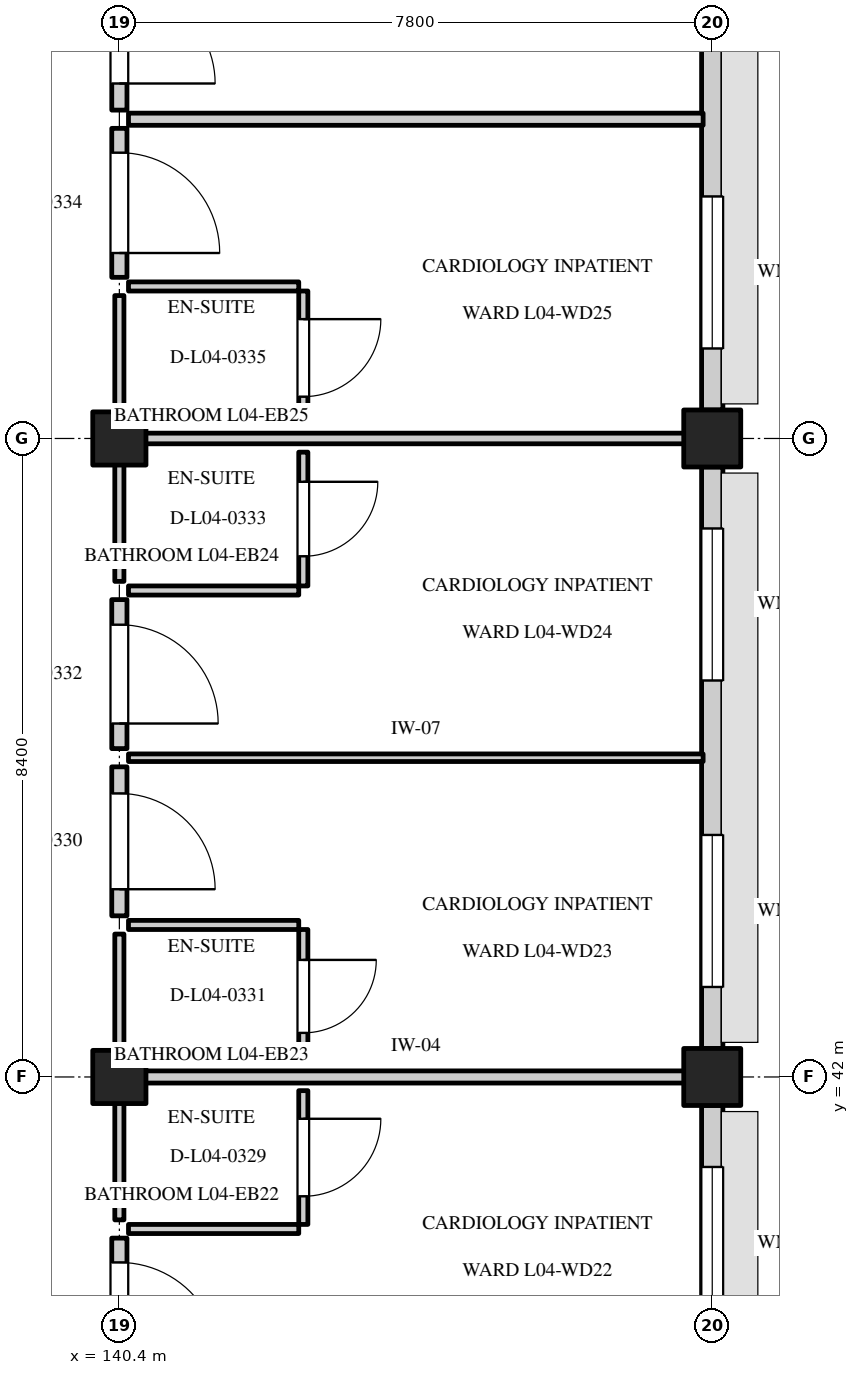
"""IFC4 building model, lengths in metres.
Left out: names, types, materials, properties, quantities, classifications, styles, units other than length and angle.
Written with IfcOpenShell. Run it as: python <this file> out.ifc"""

import sys

from ifc_helpers import new_model, si_unit, direction, frame, frame_2d, origin, origin_2d, place, context, subcontext, project, spatial, rectangle, extrude, element, fill, save


model = new_model("IFC4")
c1 = context("Model", 3, precision=1e-05, world=origin(), true_north=direction((0.0, 1.0)))
c2 = subcontext(c1, "Body", "Model", "MODEL_VIEW")
j1 = project(units=[si_unit("LENGTHUNIT", "METRE"), si_unit("PLANEANGLEUNIT", "RADIAN")], contexts=[c1])
p1 = place(None, origin())
s1 = spatial("IfcSite", under=j1, at=p1, CompositionType="ELEMENT")
p2 = place(p1, origin())
s2 = spatial("IfcBuilding", under=s1, at=p2, CompositionType="ELEMENT")
p3 = place(p2, frame((0.0, 0.0, 18.0)))
s3 = spatial("IfcBuildingStorey", under=s2, at=p3, CompositionType="ELEMENT", Elevation=18.0)
for number, where, z_axis, x_axis in (
    (1, (140.4, 42.0, 0.0), (0.0, 0.0, 1.0), (1.0, 0.0, 0.0)),
    (2, (140.4, 50.4, 0.0), (0.0, 0.0, 1.0), (1.0, 0.0, 0.0)),
):
    element("IfcColumn", number, at=place(p3, frame(where, z_axis=z_axis, x_axis=x_axis)), inside=s3, PredefinedType="COLUMN", context=c2, shape_type="SweptSolid", body=[
        extrude(rectangle(XDim=0.7, YDim=0.7, at=origin_2d()), origin(), (0.0, 0.0, 1.0), 4.2),
    ])
for number, where, z_axis, x_axis in (
    (3, (148.2, 42.0, 0.0), (0.0, 0.0, 1.0), (1.0, 0.0, 0.0)),
    (4, (148.2, 50.4, 0.0), (0.0, 0.0, 1.0), (1.0, 0.0, 0.0)),
):
    element("IfcColumn", number, at=place(p3, frame(where, z_axis=z_axis, x_axis=x_axis)), inside=s3, PredefinedType="COLUMN", context=c2, shape_type="SweptSolid", body=[
        extrude(rectangle(XDim=0.75, YDim=0.75, at=origin_2d()), origin(), (0.0, 0.0, 1.0), 4.2),
    ])
p4 = place(p3, frame((148.2, 33.975, 0.0), z_axis=(0.0, 0.0, 1.0), x_axis=(0.0, 1.0, 0.0)))
e5 = element("IfcWall", 5, at=p4, inside=s3, PredefinedType="STANDARD", context=c2, shape_type="SweptSolid", body=[
    extrude(rectangle(XDim=7.65, YDim=0.28, at=frame_2d((3.825, 0.0))), origin(), (0.0, 0.0, 1.0), 3.235),
])
p5 = place(p4, frame((0.809, 0.0, 0.8)))
e6 = element("IfcOpeningElement", 6, at=p5, cuts=e5, PredefinedType="OPENING", context=c2, shape_type="SweptSolid", body=[
    extrude(rectangle(XDim=2.0, YDim=1.75, at=frame_2d((1.0, 0.875))), frame((0.0, 0.152, 0.0), z_axis=(0.0, -1.0, 0.0), x_axis=(1.0, 0.0, 0.0)), (0.0, 0.0, 1.0), 0.304),
])
p6 = place(p4, frame((4.841, 0.0, 0.8)))
e7 = element("IfcOpeningElement", 7, at=p6, cuts=e5, PredefinedType="OPENING", context=c2, shape_type="SweptSolid", body=[
    extrude(rectangle(XDim=2.0, YDim=1.75, at=frame_2d((1.0, 0.875))), frame((0.0, 0.152, 0.0), z_axis=(0.0, -1.0, 0.0), x_axis=(1.0, 0.0, 0.0)), (0.0, 0.0, 1.0), 0.304),
])
p7 = place(p3, frame((148.2, 42.375, 0.0), z_axis=(0.0, 0.0, 1.0), x_axis=(0.0, 1.0, 0.0)))
e8 = element("IfcWall", 8, at=p7, inside=s3, PredefinedType="STANDARD", context=c2, shape_type="SweptSolid", body=[
    extrude(rectangle(XDim=7.65, YDim=0.28, at=frame_2d((3.825, 0.0))), origin(), (0.0, 0.0, 1.0), 3.235),
])
p8 = place(p7, frame((0.809, 0.0, 0.8)))
e9 = element("IfcOpeningElement", 9, at=p8, cuts=e8, PredefinedType="OPENING", context=c2, shape_type="SweptSolid", body=[
    extrude(rectangle(XDim=2.0, YDim=1.65, at=frame_2d((1.0, 0.825))), frame((0.0, 0.152, 0.0), z_axis=(0.0, -1.0, 0.0), x_axis=(1.0, 0.0, 0.0)), (0.0, 0.0, 1.0), 0.304),
])
p9 = place(p7, frame((4.841, 0.0, 0.8)))
e10 = element("IfcOpeningElement", 10, at=p9, cuts=e8, PredefinedType="OPENING", context=c2, shape_type="SweptSolid", body=[
    extrude(rectangle(XDim=2.0, YDim=1.65, at=frame_2d((1.0, 0.825))), frame((0.0, 0.152, 0.0), z_axis=(0.0, -1.0, 0.0), x_axis=(1.0, 0.0, 0.0)), (0.0, 0.0, 1.0), 0.304),
])
p10 = place(p3, frame((148.2, 50.775, 0.0), z_axis=(0.0, 0.0, 1.0), x_axis=(0.0, 1.0, 0.0)))
e11 = element("IfcWall", 11, at=p10, inside=s3, PredefinedType="STANDARD", context=c2, shape_type="SweptSolid", body=[
    extrude(rectangle(XDim=7.65, YDim=0.28, at=frame_2d((3.825, 0.0))), origin(), (0.0, 0.0, 1.0), 3.235),
])
p11 = place(p10, frame((0.809, 0.0, 0.8)))
e12 = element("IfcOpeningElement", 12, at=p11, cuts=e11, PredefinedType="OPENING", context=c2, shape_type="SweptSolid", body=[
    extrude(rectangle(XDim=2.0, YDim=1.55, at=frame_2d((1.0, 0.775))), frame((0.0, 0.152, 0.0), z_axis=(0.0, -1.0, 0.0), x_axis=(1.0, 0.0, 0.0)), (0.0, 0.0, 1.0), 0.304),
])
p12 = place(p10, frame((4.841, 0.0, 0.8)))
e13 = element("IfcOpeningElement", 13, at=p12, cuts=e11, PredefinedType="OPENING", context=c2, shape_type="SweptSolid", body=[
    extrude(rectangle(XDim=2.0, YDim=1.55, at=frame_2d((1.0, 0.775))), frame((0.0, 0.152, 0.0), z_axis=(0.0, -1.0, 0.0), x_axis=(1.0, 0.0, 0.0)), (0.0, 0.0, 1.0), 0.304),
])
p13 = place(p3, frame((140.52, 42.0, 0.0), z_axis=(0.0, 0.0, 1.0), x_axis=(1.0, 0.0, 0.0)))
e14 = element("IfcWall", 14, at=p13, inside=s3, PredefinedType="PARTITIONING", context=c2, shape_type="SweptSolid", body=[
    extrude(rectangle(XDim=7.56, YDim=0.16, at=frame_2d((3.78, 0.0))), origin(), (0.0, 0.0, 1.0), 3.865),
])
p14 = place(p3, frame((140.4, 37.92, 0.0), z_axis=(0.0, 0.0, 1.0), x_axis=(0.0, 1.0, 0.0)))
e15 = element("IfcWall", 15, at=p14, inside=s3, PredefinedType="STANDARD", context=c2, shape_type="SweptSolid", body=[
    extrude(rectangle(XDim=1.96, YDim=0.2, at=frame_2d((0.98, 0.0))), origin(), (0.0, 0.0, 1.0), 3.865),
])
p15 = place(p14, frame((0.32, 0.0, 0.0)))
e16 = element("IfcOpeningElement", 16, at=p15, cuts=e15, PredefinedType="OPENING", context=c2, shape_type="SweptSolid", body=[
    extrude(rectangle(XDim=1.32, YDim=2.2, at=frame_2d((0.66, 1.1))), frame((0.0, 0.112, 0.0), z_axis=(0.0, -1.0, 0.0), x_axis=(1.0, 0.0, 0.0)), (0.0, 0.0, 1.0), 0.224),
])
p16 = place(p3, frame((140.4, 40.12, 0.0), z_axis=(0.0, 0.0, 1.0), x_axis=(0.0, 1.0, 0.0)))
e17 = element("IfcWall", 17, at=p16, inside=s3, PredefinedType="PARTITIONING", context=c2, shape_type="SweptSolid", body=[
    extrude(rectangle(XDim=1.76, YDim=0.12, at=frame_2d((0.88, 0.0))), origin(), (0.0, 0.0, 1.0), 3.865),
])
p17 = place(p3, frame((140.52, 40.0, 0.0), z_axis=(0.0, 0.0, 1.0), x_axis=(1.0, 0.0, 0.0)))
e18 = element("IfcWall", 18, at=p17, inside=s3, PredefinedType="PARTITIONING", context=c2, shape_type="SweptSolid", body=[
    extrude(rectangle(XDim=2.24, YDim=0.12, at=frame_2d((1.12, 0.0))), origin(), (0.0, 0.0, 1.0), 3.865),
])
p18 = place(p3, frame((142.82, 40.06, 0.0), z_axis=(0.0, 0.0, 1.0), x_axis=(0.0, 1.0, 0.0)))
e19 = element("IfcWall", 19, at=p18, inside=s3, PredefinedType="PARTITIONING", context=c2, shape_type="SweptSolid", body=[
    extrude(rectangle(XDim=1.76, YDim=0.12, at=frame_2d((0.88, 0.0))), origin(), (0.0, 0.0, 1.0), 3.865),
])
p19 = place(p18, frame((0.37, 0.0, 0.0)))
e20 = element("IfcOpeningElement", 20, at=p19, cuts=e19, PredefinedType="OPENING", context=c2, shape_type="SweptSolid", body=[
    extrude(rectangle(XDim=1.02, YDim=2.15, at=frame_2d((0.51, 1.075))), frame((0.0, 0.072, 0.0), z_axis=(0.0, -1.0, 0.0), x_axis=(1.0, 0.0, 0.0)), (0.0, 0.0, 1.0), 0.144),
])
p20 = place(p3, frame((140.52, 46.2, 0.0), z_axis=(0.0, 0.0, 1.0), x_axis=(1.0, 0.0, 0.0)))
e21 = element("IfcWall", 21, at=p20, inside=s3, PredefinedType="PARTITIONING", context=c2, shape_type="SweptSolid", body=[
    extrude(rectangle(XDim=7.56, YDim=0.1, at=frame_2d((3.78, 0.0))), origin(), (0.0, 0.0, 1.0), 3.865),
])
p21 = place(p3, frame((140.4, 44.12, 0.0), z_axis=(0.0, 0.0, 1.0), x_axis=(0.0, 1.0, 0.0)))
e22 = element("IfcWall", 22, at=p21, inside=s3, PredefinedType="STANDARD", context=c2, shape_type="SweptSolid", body=[
    extrude(rectangle(XDim=1.96, YDim=0.2, at=frame_2d((0.98, 0.0))), origin(), (0.0, 0.0, 1.0), 3.865),
])
p22 = place(p21, frame((0.35, 0.0, 0.0)))
e23 = element("IfcOpeningElement", 23, at=p22, cuts=e22, PredefinedType="OPENING", context=c2, shape_type="SweptSolid", body=[
    extrude(rectangle(XDim=1.26, YDim=2.1, at=frame_2d((0.63, 1.05))), frame((0.0, 0.112, 0.0), z_axis=(0.0, -1.0, 0.0), x_axis=(1.0, 0.0, 0.0)), (0.0, 0.0, 1.0), 0.224),
])
p23 = place(p3, frame((140.4, 42.12, 0.0), z_axis=(0.0, 0.0, 1.0), x_axis=(0.0, 1.0, 0.0)))
e24 = element("IfcWall", 24, at=p23, inside=s3, PredefinedType="PARTITIONING", context=c2, shape_type="SweptSolid", body=[
    extrude(rectangle(XDim=1.76, YDim=0.12, at=frame_2d((0.88, 0.0))), origin(), (0.0, 0.0, 1.0), 3.865),
])
p24 = place(p3, frame((140.52, 44.0, 0.0), z_axis=(0.0, 0.0, 1.0), x_axis=(1.0, 0.0, 0.0)))
e25 = element("IfcWall", 25, at=p24, inside=s3, PredefinedType="PARTITIONING", context=c2, shape_type="SweptSolid", body=[
    extrude(rectangle(XDim=2.24, YDim=0.12, at=frame_2d((1.12, 0.0))), origin(), (0.0, 0.0, 1.0), 3.865),
])
p25 = place(p3, frame((142.82, 42.18, 0.0), z_axis=(0.0, 0.0, 1.0), x_axis=(0.0, 1.0, 0.0)))
e26 = element("IfcWall", 26, at=p25, inside=s3, PredefinedType="PARTITIONING", context=c2, shape_type="SweptSolid", body=[
    extrude(rectangle(XDim=1.76, YDim=0.12, at=frame_2d((0.88, 0.0))), origin(), (0.0, 0.0, 1.0), 3.865),
])
p26 = place(p25, frame((0.4, 0.0, 0.0)))
e27 = element("IfcOpeningElement", 27, at=p26, cuts=e26, PredefinedType="OPENING", context=c2, shape_type="SweptSolid", body=[
    extrude(rectangle(XDim=0.96, YDim=2.12, at=frame_2d((0.48, 1.06))), frame((0.0, 0.072, 0.0), z_axis=(0.0, -1.0, 0.0), x_axis=(1.0, 0.0, 0.0)), (0.0, 0.0, 1.0), 0.144),
])
p27 = place(p3, frame((140.52, 50.4, 0.0), z_axis=(0.0, 0.0, 1.0), x_axis=(1.0, 0.0, 0.0)))
e28 = element("IfcWall", 28, at=p27, inside=s3, PredefinedType="PARTITIONING", context=c2, shape_type="SweptSolid", body=[
    extrude(rectangle(XDim=7.56, YDim=0.14, at=frame_2d((3.78, 0.0))), origin(), (0.0, 0.0, 1.0), 3.235),
])
p28 = place(p3, frame((140.4, 46.32, 0.0), z_axis=(0.0, 0.0, 1.0), x_axis=(0.0, 1.0, 0.0)))
e29 = element("IfcWall", 29, at=p28, inside=s3, PredefinedType="STANDARD", context=c2, shape_type="SweptSolid", body=[
    extrude(rectangle(XDim=1.96, YDim=0.2, at=frame_2d((0.98, 0.0))), origin(), (0.0, 0.0, 1.0), 3.865),
])
p29 = place(p28, frame((0.33, 0.0, 0.0)))
e30 = element("IfcOpeningElement", 30, at=p29, cuts=e29, PredefinedType="OPENING", context=c2, shape_type="SweptSolid", body=[
    extrude(rectangle(XDim=1.3, YDim=2.15, at=frame_2d((0.65, 1.075))), frame((0.0, 0.112, 0.0), z_axis=(0.0, -1.0, 0.0), x_axis=(1.0, 0.0, 0.0)), (0.0, 0.0, 1.0), 0.224),
])
p30 = place(p3, frame((140.4, 48.52, 0.0), z_axis=(0.0, 0.0, 1.0), x_axis=(0.0, 1.0, 0.0)))
e31 = element("IfcWall", 31, at=p30, inside=s3, PredefinedType="PARTITIONING", context=c2, shape_type="SweptSolid", body=[
    extrude(rectangle(XDim=1.76, YDim=0.12, at=frame_2d((0.88, 0.0))), origin(), (0.0, 0.0, 1.0), 3.865),
])
p31 = place(p3, frame((140.52, 48.4, 0.0), z_axis=(0.0, 0.0, 1.0), x_axis=(1.0, 0.0, 0.0)))
e32 = element("IfcWall", 32, at=p31, inside=s3, PredefinedType="PARTITIONING", context=c2, shape_type="SweptSolid", body=[
    extrude(rectangle(XDim=2.24, YDim=0.12, at=frame_2d((1.12, 0.0))), origin(), (0.0, 0.0, 1.0), 3.865),
])
p32 = place(p3, frame((142.82, 48.46, 0.0), z_axis=(0.0, 0.0, 1.0), x_axis=(0.0, 1.0, 0.0)))
e33 = element("IfcWall", 33, at=p32, inside=s3, PredefinedType="PARTITIONING", context=c2, shape_type="SweptSolid", body=[
    extrude(rectangle(XDim=1.76, YDim=0.12, at=frame_2d((0.88, 0.0))), origin(), (0.0, 0.0, 1.0), 3.865),
])
p33 = place(p32, frame((0.39, 0.0, 0.0)))
e34 = element("IfcOpeningElement", 34, at=p33, cuts=e33, PredefinedType="OPENING", context=c2, shape_type="SweptSolid", body=[
    extrude(rectangle(XDim=0.98, YDim=2.1, at=frame_2d((0.49, 1.05))), frame((0.0, 0.072, 0.0), z_axis=(0.0, -1.0, 0.0), x_axis=(1.0, 0.0, 0.0)), (0.0, 0.0, 1.0), 0.144),
])
p34 = place(p3, frame((140.52, 54.6, 0.0), z_axis=(0.0, 0.0, 1.0), x_axis=(1.0, 0.0, 0.0)))
e35 = element("IfcWall", 35, at=p34, inside=s3, PredefinedType="PARTITIONING", context=c2, shape_type="SweptSolid", body=[
    extrude(rectangle(XDim=7.56, YDim=0.16, at=frame_2d((3.78, 0.0))), origin(), (0.0, 0.0, 1.0), 3.865),
])
p35 = place(p3, frame((140.4, 52.52, 0.0), z_axis=(0.0, 0.0, 1.0), x_axis=(0.0, 1.0, 0.0)))
e36 = element("IfcWall", 36, at=p35, inside=s3, PredefinedType="STANDARD", context=c2, shape_type="SweptSolid", body=[
    extrude(rectangle(XDim=1.96, YDim=0.2, at=frame_2d((0.98, 0.0))), origin(), (0.0, 0.0, 1.0), 3.865),
])
p36 = place(p35, frame((0.32, 0.0, 0.0)))
e37 = element("IfcOpeningElement", 37, at=p36, cuts=e36, PredefinedType="OPENING", context=c2, shape_type="SweptSolid", body=[
    extrude(rectangle(XDim=1.32, YDim=2.2, at=frame_2d((0.66, 1.1))), frame((0.0, 0.112, 0.0), z_axis=(0.0, -1.0, 0.0), x_axis=(1.0, 0.0, 0.0)), (0.0, 0.0, 1.0), 0.224),
])
p37 = place(p3, frame((140.4, 50.52, 0.0), z_axis=(0.0, 0.0, 1.0), x_axis=(0.0, 1.0, 0.0)))
e38 = element("IfcWall", 38, at=p37, inside=s3, PredefinedType="PARTITIONING", context=c2, shape_type="SweptSolid", body=[
    extrude(rectangle(XDim=1.76, YDim=0.12, at=frame_2d((0.88, 0.0))), origin(), (0.0, 0.0, 1.0), 3.865),
])
p38 = place(p3, frame((140.52, 52.4, 0.0), z_axis=(0.0, 0.0, 1.0), x_axis=(1.0, 0.0, 0.0)))
e39 = element("IfcWall", 39, at=p38, inside=s3, PredefinedType="PARTITIONING", context=c2, shape_type="SweptSolid", body=[
    extrude(rectangle(XDim=2.24, YDim=0.12, at=frame_2d((1.12, 0.0))), origin(), (0.0, 0.0, 1.0), 3.865),
])
p39 = place(p3, frame((142.82, 50.58, 0.0), z_axis=(0.0, 0.0, 1.0), x_axis=(0.0, 1.0, 0.0)))
e40 = element("IfcWall", 40, at=p39, inside=s3, PredefinedType="PARTITIONING", context=c2, shape_type="SweptSolid", body=[
    extrude(rectangle(XDim=1.76, YDim=0.12, at=frame_2d((0.88, 0.0))), origin(), (0.0, 0.0, 1.0), 3.865),
])
p40 = place(p39, frame((0.37, 0.0, 0.0)))
e41 = element("IfcOpeningElement", 41, at=p40, cuts=e40, PredefinedType="OPENING", context=c2, shape_type="SweptSolid", body=[
    extrude(rectangle(XDim=1.02, YDim=2.15, at=frame_2d((0.51, 1.075))), frame((0.0, 0.072, 0.0), z_axis=(0.0, -1.0, 0.0), x_axis=(1.0, 0.0, 0.0)), (0.0, 0.0, 1.0), 0.144),
])
p41 = place(p3, frame((140.4, 54.72, 0.0), z_axis=(0.0, 0.0, 1.0), x_axis=(0.0, 1.0, 0.0)))
e42 = element("IfcWall", 42, at=p41, inside=s3, PredefinedType="STANDARD", context=c2, shape_type="SweptSolid", body=[
    extrude(rectangle(XDim=1.96, YDim=0.2, at=frame_2d((0.98, 0.0))), origin(), (0.0, 0.0, 1.0), 3.865),
])
p42 = place(p41, frame((0.35, 0.0, 0.0)))
e43 = element("IfcOpeningElement", 43, at=p42, cuts=e42, PredefinedType="OPENING", context=c2, shape_type="SweptSolid", body=[
    extrude(rectangle(XDim=1.26, YDim=2.1, at=frame_2d((0.63, 1.05))), frame((0.0, 0.112, 0.0), z_axis=(0.0, -1.0, 0.0), x_axis=(1.0, 0.0, 0.0)), (0.0, 0.0, 1.0), 0.224),
])
p43 = place(p6, origin())
e44 = element("IfcWindow", 44, at=p43, inside=s3, PartitioningType="DOUBLE_PANEL_VERTICAL", PredefinedType="WINDOW", context=c2, shape_type="SweptSolid", body=[
    extrude(rectangle(XDim=2.0, YDim=1.75, at=frame_2d((1.0, 0.875))), frame((0.0, 0.03, 0.0), z_axis=(0.0, -1.0, 0.0), x_axis=(1.0, 0.0, 0.0)), (0.0, 0.0, 1.0), 0.06),
])
fill(e7, e44)
p44 = place(p8, origin())
e45 = element("IfcWindow", 45, at=p44, inside=s3, PartitioningType="DOUBLE_PANEL_VERTICAL", PredefinedType="WINDOW", context=c2, shape_type="SweptSolid", body=[
    extrude(rectangle(XDim=2.0, YDim=1.65, at=frame_2d((1.0, 0.825))), frame((0.0, 0.03, 0.0), z_axis=(0.0, -1.0, 0.0), x_axis=(1.0, 0.0, 0.0)), (0.0, 0.0, 1.0), 0.06),
])
fill(e9, e45)
p45 = place(p9, origin())
e46 = element("IfcWindow", 46, at=p45, inside=s3, PartitioningType="DOUBLE_PANEL_VERTICAL", PredefinedType="WINDOW", context=c2, shape_type="SweptSolid", body=[
    extrude(rectangle(XDim=2.0, YDim=1.65, at=frame_2d((1.0, 0.825))), frame((0.0, 0.03, 0.0), z_axis=(0.0, -1.0, 0.0), x_axis=(1.0, 0.0, 0.0)), (0.0, 0.0, 1.0), 0.06),
])
fill(e10, e46)
p46 = place(p11, origin())
e47 = element("IfcWindow", 47, at=p46, inside=s3, PartitioningType="DOUBLE_PANEL_VERTICAL", PredefinedType="WINDOW", context=c2, shape_type="SweptSolid", body=[
    extrude(rectangle(XDim=2.0, YDim=1.55, at=frame_2d((1.0, 0.775))), frame((0.0, 0.03, 0.0), z_axis=(0.0, -1.0, 0.0), x_axis=(1.0, 0.0, 0.0)), (0.0, 0.0, 1.0), 0.06),
])
fill(e12, e47)
p47 = place(p15, frame((1.32, 0.0, 0.0), z_axis=(0.0, 0.0, 1.0), x_axis=(-1.0, 0.0, 0.0)))
e48 = element("IfcDoor", 48, at=p47, inside=s3, OperationType="SINGLE_SWING_RIGHT", PredefinedType="DOOR", context=c2, shape_type="SweptSolid", body=[
    extrude(rectangle(XDim=1.32, YDim=2.2, at=frame_2d((0.66, 1.1))), frame((0.0, 0.025, 0.0), z_axis=(0.0, -1.0, 0.0), x_axis=(1.0, 0.0, 0.0)), (0.0, 0.0, 1.0), 0.05),
])
fill(e16, e48)
p48 = place(p19, origin())
e49 = element("IfcDoor", 49, at=p48, inside=s3, OperationType="SINGLE_SWING_RIGHT", PredefinedType="DOOR", context=c2, shape_type="SweptSolid", body=[
    extrude(rectangle(XDim=1.02, YDim=2.15, at=frame_2d((0.51, 1.075))), frame((0.0, 0.025, 0.0), z_axis=(0.0, -1.0, 0.0), x_axis=(1.0, 0.0, 0.0)), (0.0, 0.0, 1.0), 0.05),
])
fill(e20, e49)
p49 = place(p22, frame((1.26, 0.0, 0.0), z_axis=(0.0, 0.0, 1.0), x_axis=(-1.0, 0.0, 0.0)))
e50 = element("IfcDoor", 50, at=p49, inside=s3, OperationType="SINGLE_SWING_RIGHT", PredefinedType="DOOR", context=c2, shape_type="SweptSolid", body=[
    extrude(rectangle(XDim=1.26, YDim=2.1, at=frame_2d((0.63, 1.05))), frame((0.0, 0.025, 0.0), z_axis=(0.0, -1.0, 0.0), x_axis=(1.0, 0.0, 0.0)), (0.0, 0.0, 1.0), 0.05),
])
fill(e23, e50)
p50 = place(p26, origin())
e51 = element("IfcDoor", 51, at=p50, inside=s3, OperationType="SINGLE_SWING_RIGHT", PredefinedType="DOOR", context=c2, shape_type="SweptSolid", body=[
    extrude(rectangle(XDim=0.96, YDim=2.12, at=frame_2d((0.48, 1.06))), frame((0.0, 0.025, 0.0), z_axis=(0.0, -1.0, 0.0), x_axis=(1.0, 0.0, 0.0)), (0.0, 0.0, 1.0), 0.05),
])
fill(e27, e51)
p51 = place(p29, frame((1.3, 0.0, 0.0), z_axis=(0.0, 0.0, 1.0), x_axis=(-1.0, 0.0, 0.0)))
e52 = element("IfcDoor", 52, at=p51, inside=s3, OperationType="SINGLE_SWING_RIGHT", PredefinedType="DOOR", context=c2, shape_type="SweptSolid", body=[
    extrude(rectangle(XDim=1.3, YDim=2.15, at=frame_2d((0.65, 1.075))), frame((0.0, 0.025, 0.0), z_axis=(0.0, -1.0, 0.0), x_axis=(1.0, 0.0, 0.0)), (0.0, 0.0, 1.0), 0.05),
])
fill(e30, e52)
p52 = place(p33, origin())
e53 = element("IfcDoor", 53, at=p52, inside=s3, OperationType="SINGLE_SWING_RIGHT", PredefinedType="DOOR", context=c2, shape_type="SweptSolid", body=[
    extrude(rectangle(XDim=0.98, YDim=2.1, at=frame_2d((0.49, 1.05))), frame((0.0, 0.025, 0.0), z_axis=(0.0, -1.0, 0.0), x_axis=(1.0, 0.0, 0.0)), (0.0, 0.0, 1.0), 0.05),
])
fill(e34, e53)
p53 = place(p36, frame((1.32, 0.0, 0.0), z_axis=(0.0, 0.0, 1.0), x_axis=(-1.0, 0.0, 0.0)))
e54 = element("IfcDoor", 54, at=p53, inside=s3, OperationType="SINGLE_SWING_RIGHT", PredefinedType="DOOR", context=c2, shape_type="SweptSolid", body=[
    extrude(rectangle(XDim=1.32, YDim=2.2, at=frame_2d((0.66, 1.1))), frame((0.0, 0.025, 0.0), z_axis=(0.0, -1.0, 0.0), x_axis=(1.0, 0.0, 0.0)), (0.0, 0.0, 1.0), 0.05),
])
fill(e37, e54)
p54 = place(p40, origin())
e55 = element("IfcDoor", 55, at=p54, inside=s3, OperationType="SINGLE_SWING_RIGHT", PredefinedType="DOOR", context=c2, shape_type="SweptSolid", body=[
    extrude(rectangle(XDim=1.02, YDim=2.15, at=frame_2d((0.51, 1.075))), frame((0.0, 0.025, 0.0), z_axis=(0.0, -1.0, 0.0), x_axis=(1.0, 0.0, 0.0)), (0.0, 0.0, 1.0), 0.05),
])
fill(e41, e55)
p55 = place(p42, frame((1.26, 0.0, 0.0), z_axis=(0.0, 0.0, 1.0), x_axis=(-1.0, 0.0, 0.0)))
e56 = element("IfcDoor", 56, at=p55, inside=s3, OperationType="SINGLE_SWING_RIGHT", PredefinedType="DOOR", context=c2, shape_type="SweptSolid", body=[
    extrude(rectangle(XDim=1.26, YDim=2.1, at=frame_2d((0.63, 1.05))), frame((0.0, 0.025, 0.0), z_axis=(0.0, -1.0, 0.0), x_axis=(1.0, 0.0, 0.0)), (0.0, 0.0, 1.0), 0.05),
])
fill(e43, e56)
save(model, sys.argv[1])
